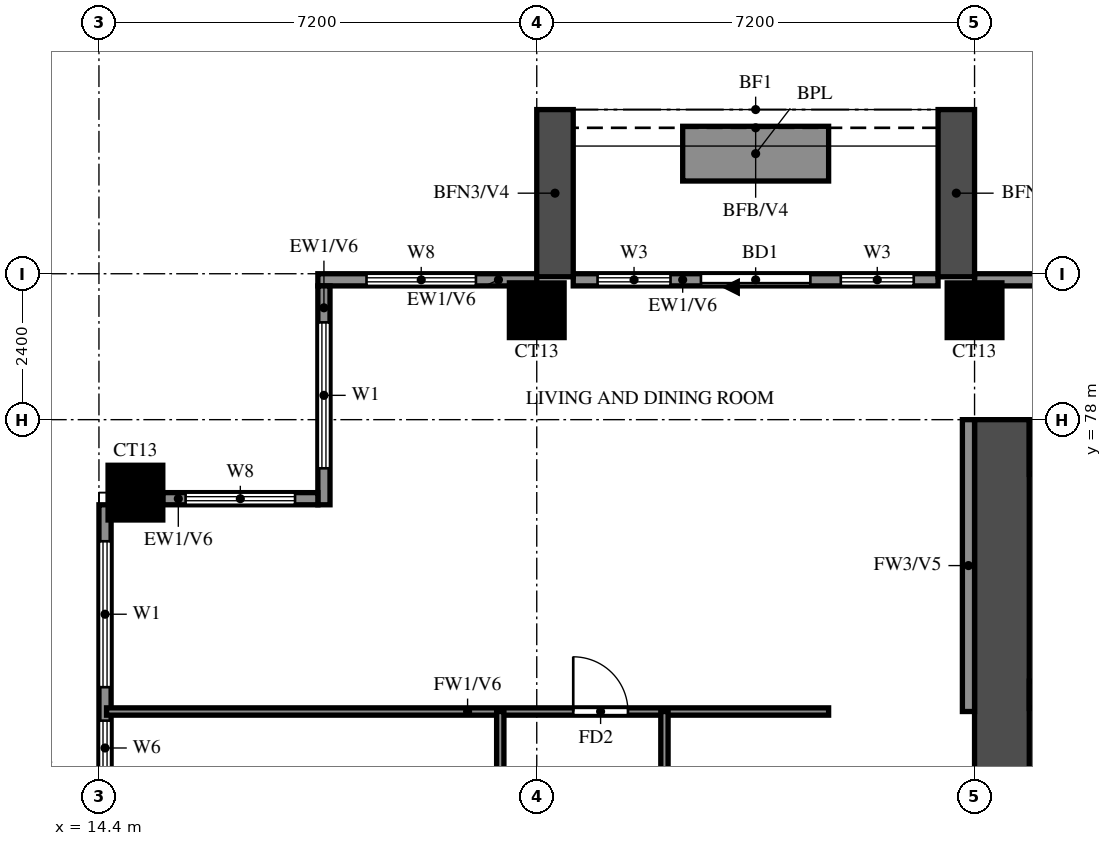
"""IFC4 building model, lengths in metres.
Left out: names, types, materials, properties, quantities, classifications, styles, units other than length and angle.
Written with IfcOpenShell. Run it as: python <this file> out.ifc"""

import sys

from ifc_helpers import new_model, si_unit, direction, frame, frame_2d, origin, origin_2d, place, context, subcontext, project, spatial, rectangle, extrude, source, transform, mapped, element, fill, save


model = new_model("IFC4")
c1 = context("Model", 3, precision=1e-05, world=origin(), true_north=direction((0.0, 1.0)))
c2 = subcontext(c1, "Body", "Model", "MODEL_VIEW")
j1 = project(units=[si_unit("LENGTHUNIT", "METRE"), si_unit("PLANEANGLEUNIT", "RADIAN")], contexts=[c1])
p1 = place(None, origin())
s1 = spatial("IfcSite", under=j1, at=p1, CompositionType="ELEMENT")
p2 = place(p1, origin())
s2 = spatial("IfcBuilding", under=s1, at=p2, CompositionType="ELEMENT")
p3 = place(p2, frame((0.0, 0.0, 104.0)))
s3 = spatial("IfcBuildingStorey", under=s2, at=p3, CompositionType="ELEMENT", Elevation=104.0)
m1 = source(origin(), c2, "Body", "SweptSolid", [
    extrude(rectangle(XDim=0.9, YDim=0.9, at=origin_2d()), origin(), (0.0, 0.0, 1.0), 3.1),
])
for number, where, z_axis, x_axis in (
    (1, (15.0, 76.8, 0.0), (0.0, 0.0, 1.0), (1.0, 0.0, 0.0)),
    (2, (21.6, 79.8, 0.0), (0.0, 0.0, 1.0), (1.0, 0.0, 0.0)),
    (3, (28.8, 79.8, 0.0), (0.0, 0.0, 1.0), (1.0, 0.0, 0.0)),
):
    element("IfcColumn", number, at=place(p3, frame(where, z_axis=z_axis, x_axis=x_axis)), inside=s3, PredefinedType="COLUMN", context=c2, shape_type="MappedRepresentation", body=[
        mapped(m1, transform((0.0, 0.0, 0.0))),
    ])
p4 = place(p3, frame((29.25, 66.0, 0.0), z_axis=(0.0, 0.0, 1.0), x_axis=(0.0, 1.0, 0.0)))
e4 = element("IfcWall", 4, at=p4, inside=s3, PredefinedType="SHEAR", context=c2, shape_type="SweptSolid", body=[
    extrude(rectangle(XDim=12.0, YDim=0.9, at=frame_2d((6.0, 0.0))), origin(), (0.0, 0.0, 1.0), 3.1),
])
p5 = place(p3, frame((29.7, 77.55, 0.0), z_axis=(0.0, 0.0, 1.0), x_axis=(1.0, 0.0, 0.0)))
e5 = element("IfcWall", 5, at=p5, inside=s3, PredefinedType="SHEAR", context=c2, shape_type="SweptSolid", body=[
    extrude(rectangle(XDim=41.4, YDim=0.9, at=frame_2d((20.7, 0.0))), origin(), (0.0, 0.0, 1.0), 3.1),
])
p6 = place(p3, frame((29.7, 73.475, 0.0), z_axis=(0.0, 0.0, 1.0), x_axis=(1.0, 0.0, 0.0)))
e6 = element("IfcWall", 6, at=p6, inside=s3, PredefinedType="SHEAR", context=c2, shape_type="SweptSolid", body=[
    extrude(rectangle(XDim=3.175, YDim=0.45, at=frame_2d((1.587, 0.0))), origin(), (0.0, 0.0, 1.0), 3.1),
])
p7 = place(p3, frame((82.6, 80.3, 0.0), z_axis=(0.0, 0.0, 1.0), x_axis=(-1.0, 0.0, 0.0)))
e7 = element("IfcWall", 7, at=p7, inside=s3, PredefinedType="SOLIDWALL", context=c2, shape_type="SweptSolid", body=[
    extrude(rectangle(XDim=53.8, YDim=0.2, at=frame_2d((26.9, 0.0))), origin(), (0.0, 0.0, 1.0), 3.1),
])
p8 = place(p7, frame((0.7, 0.0, 0.6)))
e8 = element("IfcOpeningElement", 8, at=p8, cuts=e7, PredefinedType="OPENING", context=c2, shape_type="SweptSolid", body=[
    extrude(rectangle(XDim=1.8, YDim=2.4, at=frame_2d((0.9, 1.2))), frame((0.0, 0.11, 0.0), z_axis=(0.0, -1.0, 0.0), x_axis=(1.0, 0.0, 0.0)), (0.0, 0.0, 1.0), 0.22),
])
p9 = place(p7, frame((4.367, 0.0, 0.6)))
e9 = element("IfcOpeningElement", 9, at=p9, cuts=e7, PredefinedType="OPENING", context=c2, shape_type="SweptSolid", body=[
    extrude(rectangle(XDim=2.4, YDim=2.4, at=frame_2d((1.2, 1.2))), frame((0.0, 0.11, 0.0), z_axis=(0.0, -1.0, 0.0), x_axis=(1.0, 0.0, 0.0)), (0.0, 0.0, 1.0), 0.22),
])
p10 = place(p7, frame((7.233, 0.0, 0.6)))
e10 = element("IfcOpeningElement", 10, at=p10, cuts=e7, PredefinedType="OPENING", context=c2, shape_type="SweptSolid", body=[
    extrude(rectangle(XDim=2.4, YDim=2.4, at=frame_2d((1.2, 1.2))), frame((0.0, 0.11, 0.0), z_axis=(0.0, -1.0, 0.0), x_axis=(1.0, 0.0, 0.0)), (0.0, 0.0, 1.0), 0.22),
])
p11 = place(p3, frame((28.2, 80.3, 0.0), z_axis=(0.0, 0.0, 1.0), x_axis=(-1.0, 0.0, 0.0)))
e11 = element("IfcWall", 11, at=p11, inside=s3, PredefinedType="SOLIDWALL", context=c2, shape_type="SweptSolid", body=[
    extrude(rectangle(XDim=6.0, YDim=0.2, at=frame_2d((3.0, 0.0))), origin(), (0.0, 0.0, 1.0), 3.1),
])
p12 = place(p11, frame((2.1, 0.0, 0.0)))
e12 = element("IfcOpeningElement", 12, at=p12, cuts=e11, PredefinedType="OPENING", context=c2, shape_type="SweptSolid", body=[
    extrude(rectangle(XDim=1.8, YDim=2.4, at=frame_2d((0.9, 1.2))), frame((0.0, 0.11, 0.0), z_axis=(0.0, -1.0, 0.0), x_axis=(1.0, 0.0, 0.0)), (0.0, 0.0, 1.0), 0.22),
])
p13 = place(p11, frame((0.4, 0.0, 0.6)))
e13 = element("IfcOpeningElement", 13, at=p13, cuts=e11, PredefinedType="OPENING", context=c2, shape_type="SweptSolid", body=[
    extrude(rectangle(XDim=1.2, YDim=2.4, at=frame_2d((0.6, 1.2))), frame((0.0, 0.11, 0.0), z_axis=(0.0, -1.0, 0.0), x_axis=(1.0, 0.0, 0.0)), (0.0, 0.0, 1.0), 0.22),
])
p14 = place(p11, frame((4.4, 0.0, 0.6)))
e14 = element("IfcOpeningElement", 14, at=p14, cuts=e11, PredefinedType="OPENING", context=c2, shape_type="SweptSolid", body=[
    extrude(rectangle(XDim=1.2, YDim=2.4, at=frame_2d((0.6, 1.2))), frame((0.0, 0.11, 0.0), z_axis=(0.0, -1.0, 0.0), x_axis=(1.0, 0.0, 0.0)), (0.0, 0.0, 1.0), 0.22),
])
p15 = place(p3, frame((21.6, 80.3, 0.0), z_axis=(0.0, 0.0, 1.0), x_axis=(-1.0, 0.0, 0.0)))
e15 = element("IfcWall", 15, at=p15, inside=s3, PredefinedType="SOLIDWALL", context=c2, shape_type="SweptSolid", body=[
    extrude(rectangle(XDim=3.6, YDim=0.2, at=frame_2d((1.8, 0.0))), origin(), (0.0, 0.0, 1.0), 3.1),
])
p16 = place(p15, frame((1.0, 0.0, 0.6)))
e16 = element("IfcOpeningElement", 16, at=p16, cuts=e15, PredefinedType="OPENING", context=c2, shape_type="SweptSolid", body=[
    extrude(rectangle(XDim=1.8, YDim=2.4, at=frame_2d((0.9, 1.2))), frame((0.0, 0.11, 0.0), z_axis=(0.0, -1.0, 0.0), x_axis=(1.0, 0.0, 0.0)), (0.0, 0.0, 1.0), 0.22),
])
p17 = place(p3, frame((18.1, 80.2, 0.0), z_axis=(0.0, 0.0, 1.0), x_axis=(0.0, -1.0, 0.0)))
e17 = element("IfcWall", 17, at=p17, inside=s3, PredefinedType="SOLIDWALL", context=c2, shape_type="SweptSolid", body=[
    extrude(rectangle(XDim=3.6, YDim=0.2, at=frame_2d((1.8, 0.0))), origin(), (0.0, 0.0, 1.0), 3.1),
])
p18 = place(p17, frame((0.6, 0.0, 0.6)))
e18 = element("IfcOpeningElement", 18, at=p18, cuts=e17, PredefinedType="OPENING", context=c2, shape_type="SweptSolid", body=[
    extrude(rectangle(XDim=2.4, YDim=2.4, at=frame_2d((1.2, 1.2))), frame((0.0, 0.11, 0.0), z_axis=(0.0, -1.0, 0.0), x_axis=(1.0, 0.0, 0.0)), (0.0, 0.0, 1.0), 0.22),
])
p19 = place(p3, frame((18.0, 76.7, 0.0), z_axis=(0.0, 0.0, 1.0), x_axis=(-1.0, 0.0, 0.0)))
e19 = element("IfcWall", 19, at=p19, inside=s3, PredefinedType="SOLIDWALL", context=c2, shape_type="SweptSolid", body=[
    extrude(rectangle(XDim=2.55, YDim=0.2, at=frame_2d((1.275, 0.0))), origin(), (0.0, 0.0, 1.0), 3.1),
])
p20 = place(p19, frame((0.375, 0.0, 0.6)))
e20 = element("IfcOpeningElement", 20, at=p20, cuts=e19, PredefinedType="OPENING", context=c2, shape_type="SweptSolid", body=[
    extrude(rectangle(XDim=1.8, YDim=2.4, at=frame_2d((0.9, 1.2))), frame((0.0, 0.11, 0.0), z_axis=(0.0, -1.0, 0.0), x_axis=(1.0, 0.0, 0.0)), (0.0, 0.0, 1.0), 0.22),
])
p21 = place(p3, frame((14.5, 76.6, 0.0), z_axis=(0.0, 0.0, 1.0), x_axis=(0.0, -1.0, 0.0)))
e21 = element("IfcWall", 21, at=p21, inside=s3, PredefinedType="SOLIDWALL", context=c2, shape_type="SweptSolid", body=[
    extrude(rectangle(XDim=39.4, YDim=0.2, at=frame_2d((19.7, 0.0))), origin(), (0.0, 0.0, 1.0), 3.1),
])
p22 = place(p21, frame((7.9, 0.0, 0.0)))
e22 = element("IfcOpeningElement", 22, at=p22, cuts=e21, PredefinedType="OPENING", context=c2, shape_type="SweptSolid", body=[
    extrude(rectangle(XDim=1.8, YDim=2.4, at=frame_2d((0.9, 1.2))), frame((0.0, 0.11, 0.0), z_axis=(0.0, -1.0, 0.0), x_axis=(1.0, 0.0, 0.0)), (0.0, 0.0, 1.0), 0.22),
])
p23 = place(p21, frame((29.567, 0.0, 0.6)))
e23 = element("IfcOpeningElement", 23, at=p23, cuts=e21, PredefinedType="OPENING", context=c2, shape_type="SweptSolid", body=[
    extrude(rectangle(XDim=2.4, YDim=2.4, at=frame_2d((1.2, 1.2))), frame((0.0, 0.11, 0.0), z_axis=(0.0, -1.0, 0.0), x_axis=(1.0, 0.0, 0.0)), (0.0, 0.0, 1.0), 0.22),
])
p24 = place(p21, frame((32.433, 0.0, 0.6)))
e24 = element("IfcOpeningElement", 24, at=p24, cuts=e21, PredefinedType="OPENING", context=c2, shape_type="SweptSolid", body=[
    extrude(rectangle(XDim=2.4, YDim=2.4, at=frame_2d((1.2, 1.2))), frame((0.0, 0.11, 0.0), z_axis=(0.0, -1.0, 0.0), x_axis=(1.0, 0.0, 0.0)), (0.0, 0.0, 1.0), 0.22),
])
p25 = place(p21, frame((36.8, 0.0, 0.6)))
e25 = element("IfcOpeningElement", 25, at=p25, cuts=e21, PredefinedType="OPENING", context=c2, shape_type="SweptSolid", body=[
    extrude(rectangle(XDim=1.8, YDim=2.4, at=frame_2d((0.9, 1.2))), frame((0.0, 0.11, 0.0), z_axis=(0.0, -1.0, 0.0), x_axis=(1.0, 0.0, 0.0)), (0.0, 0.0, 1.0), 0.22),
])
p26 = place(p21, frame((25.4, 0.0, 0.6)))
e26 = element("IfcOpeningElement", 26, at=p26, cuts=e21, PredefinedType="OPENING", context=c2, shape_type="SweptSolid", body=[
    extrude(rectangle(XDim=2.4, YDim=2.4, at=frame_2d((1.2, 1.2))), frame((0.0, 0.11, 0.0), z_axis=(0.0, -1.0, 0.0), x_axis=(1.0, 0.0, 0.0)), (0.0, 0.0, 1.0), 0.22),
])
p27 = place(p21, frame((22.95, 0.0, 1.5)))
e27 = element("IfcOpeningElement", 27, at=p27, cuts=e21, PredefinedType="OPENING", context=c2, shape_type="SweptSolid", body=[
    extrude(rectangle(XDim=0.9, YDim=0.9, at=frame_2d((0.45, 0.45))), frame((0.0, 0.11, 0.0), z_axis=(0.0, -1.0, 0.0), x_axis=(1.0, 0.0, 0.0)), (0.0, 0.0, 1.0), 0.22),
])
p28 = place(p21, frame((15.167, 0.0, 0.6)))
e28 = element("IfcOpeningElement", 28, at=p28, cuts=e21, PredefinedType="OPENING", context=c2, shape_type="SweptSolid", body=[
    extrude(rectangle(XDim=2.4, YDim=2.4, at=frame_2d((1.2, 1.2))), frame((0.0, 0.11, 0.0), z_axis=(0.0, -1.0, 0.0), x_axis=(1.0, 0.0, 0.0)), (0.0, 0.0, 1.0), 0.22),
])
p29 = place(p21, frame((18.033, 0.0, 0.6)))
e29 = element("IfcOpeningElement", 29, at=p29, cuts=e21, PredefinedType="OPENING", context=c2, shape_type="SweptSolid", body=[
    extrude(rectangle(XDim=2.4, YDim=2.4, at=frame_2d((1.2, 1.2))), frame((0.0, 0.11, 0.0), z_axis=(0.0, -1.0, 0.0), x_axis=(1.0, 0.0, 0.0)), (0.0, 0.0, 1.0), 0.22),
])
p30 = place(p21, frame((11.9, 0.0, 0.6)))
e30 = element("IfcOpeningElement", 30, at=p30, cuts=e21, PredefinedType="OPENING", context=c2, shape_type="SweptSolid", body=[
    extrude(rectangle(XDim=1.8, YDim=2.4, at=frame_2d((0.9, 1.2))), frame((0.0, 0.11, 0.0), z_axis=(0.0, -1.0, 0.0), x_axis=(1.0, 0.0, 0.0)), (0.0, 0.0, 1.0), 0.22),
])
p31 = place(p21, frame((3.55, 0.0, 1.5)))
e31 = element("IfcOpeningElement", 31, at=p31, cuts=e21, PredefinedType="OPENING", context=c2, shape_type="SweptSolid", body=[
    extrude(rectangle(XDim=0.9, YDim=0.9, at=frame_2d((0.45, 0.45))), frame((0.0, 0.11, 0.0), z_axis=(0.0, -1.0, 0.0), x_axis=(1.0, 0.0, 0.0)), (0.0, 0.0, 1.0), 0.22),
])
p32 = place(p21, frame((5.45, 0.0, 1.5)))
e32 = element("IfcOpeningElement", 32, at=p32, cuts=e21, PredefinedType="OPENING", context=c2, shape_type="SweptSolid", body=[
    extrude(rectangle(XDim=0.9, YDim=0.9, at=frame_2d((0.45, 0.45))), frame((0.0, 0.11, 0.0), z_axis=(0.0, -1.0, 0.0), x_axis=(1.0, 0.0, 0.0)), (0.0, 0.0, 1.0), 0.22),
])
p33 = place(p21, frame((0.6, 0.0, 0.6)))
e33 = element("IfcOpeningElement", 33, at=p33, cuts=e21, PredefinedType="OPENING", context=c2, shape_type="SweptSolid", body=[
    extrude(rectangle(XDim=2.4, YDim=2.4, at=frame_2d((1.2, 1.2))), frame((0.0, 0.11, 0.0), z_axis=(0.0, -1.0, 0.0), x_axis=(1.0, 0.0, 0.0)), (0.0, 0.0, 1.0), 0.22),
])
for number, where, z_axis, x_axis in (
    (34, (28.5, 80.35, 0.0), (0.0, 0.0, 1.0), (0.0, 1.0, 0.0)),
    (35, (21.9, 80.35, 0.0), (0.0, 0.0, 1.0), (0.0, 1.0, 0.0)),
):
    element("IfcWall", number, at=place(p3, frame(where, z_axis=z_axis, x_axis=x_axis)), inside=s3, PredefinedType="SOLIDWALL", context=c2, shape_type="SweptSolid", body=[
        extrude(rectangle(XDim=2.75, YDim=0.6, at=frame_2d((1.375, 0.0))), origin(), (0.0, 0.0, 1.0), 2.77),
    ])
p34 = place(p3, frame((26.4, 82.375, 0.0), z_axis=(0.0, 0.0, 1.0), x_axis=(-1.0, 0.0, 0.0)))
e36 = element("IfcWall", 36, at=p34, inside=s3, PredefinedType="SOLIDWALL", context=c2, shape_type="SweptSolid", body=[
    extrude(rectangle(XDim=2.4, YDim=0.9, at=frame_2d((1.2, 0.0))), origin(), (0.0, 0.0, 1.0), 0.9),
])
p35 = place(p3, frame((28.7, 73.2, 0.0), z_axis=(0.0, 0.0, 1.0), x_axis=(0.0, 1.0, 0.0)))
e37 = element("IfcWall", 37, at=p35, inside=s3, PredefinedType="SOLIDWALL", context=c2, shape_type="SweptSolid", body=[
    extrude(rectangle(XDim=4.8, YDim=0.2, at=frame_2d((2.4, 0.0))), origin(), (0.0, 0.0, 1.0), 3.1),
])
p36 = place(p3, frame((14.525, 73.2, 0.0), z_axis=(0.0, 0.0, 1.0), x_axis=(1.0, 0.0, 0.0)))
e38 = element("IfcWall", 38, at=p36, inside=s3, PredefinedType="PARTITIONING", context=c2, shape_type="SweptSolid", body=[
    extrude(rectangle(XDim=11.875, YDim=0.12, at=frame_2d((5.938, 0.0))), origin(), (0.0, 0.0, 1.0), 3.1),
])
p37 = place(p36, frame((7.675, 0.0, 0.0)))
e39 = element("IfcOpeningElement", 39, at=p37, cuts=e38, PredefinedType="OPENING", context=c2, shape_type="SweptSolid", body=[
    extrude(rectangle(XDim=0.9, YDim=2.1, at=frame_2d((0.45, 1.05))), frame((0.0, 0.07, 0.0), z_axis=(0.0, -1.0, 0.0), x_axis=(1.0, 0.0, 0.0)), (0.0, 0.0, 1.0), 0.14),
])
p38 = place(p3, frame((21.0, 69.6, 0.0), z_axis=(0.0, 0.0, 1.0), x_axis=(0.0, 1.0, 0.0)))
e40 = element("IfcWall", 40, at=p38, inside=s3, PredefinedType="PARTITIONING", context=c2, shape_type="SweptSolid", body=[
    extrude(rectangle(XDim=3.6, YDim=0.12, at=frame_2d((1.8, 0.0))), origin(), (0.0, 0.0, 1.0), 3.1),
])
p39 = place(p3, frame((23.7, 64.8, 0.0), z_axis=(0.0, 0.0, 1.0), x_axis=(0.0, 1.0, 0.0)))
e41 = element("IfcWall", 41, at=p39, inside=s3, PredefinedType="PARTITIONING", context=c2, shape_type="SweptSolid", body=[
    extrude(rectangle(XDim=8.4, YDim=0.12, at=frame_2d((4.2, 0.0))), origin(), (0.0, 0.0, 1.0), 3.1),
])
p40 = place(p39, frame((1.475, 0.0, 0.0)))
e42 = element("IfcOpeningElement", 42, at=p40, cuts=e41, PredefinedType="OPENING", context=c2, shape_type="SweptSolid", body=[
    extrude(rectangle(XDim=0.9, YDim=2.1, at=frame_2d((0.45, 1.05))), frame((0.0, 0.07, 0.0), z_axis=(0.0, -1.0, 0.0), x_axis=(1.0, 0.0, 0.0)), (0.0, 0.0, 1.0), 0.14),
])
p41 = place(p39, frame((5.675, 0.0, 0.0)))
e43 = element("IfcOpeningElement", 43, at=p41, cuts=e41, PredefinedType="OPENING", context=c2, shape_type="SweptSolid", body=[
    extrude(rectangle(XDim=0.9, YDim=2.1, at=frame_2d((0.45, 1.05))), frame((0.0, 0.07, 0.0), z_axis=(0.0, -1.0, 0.0), x_axis=(1.0, 0.0, 0.0)), (0.0, 0.0, 1.0), 0.14),
])
p42 = place(p12, origin())
e44 = element("IfcDoor", 44, at=p42, inside=s3, OperationType="DOUBLE_DOOR_SLIDING", PredefinedType="DOOR", context=c2, shape_type="SweptSolid", body=[
    extrude(rectangle(XDim=1.8, YDim=2.4, at=frame_2d((0.9, 1.2))), frame((0.0, 0.025, 0.0), z_axis=(0.0, -1.0, 0.0), x_axis=(1.0, 0.0, 0.0)), (0.0, 0.0, 1.0), 0.05),
])
fill(e12, e44)
p43 = place(p13, origin())
e45 = element("IfcWindow", 45, at=p43, inside=s3, PartitioningType="SINGLE_PANEL", PredefinedType="WINDOW", context=c2, shape_type="SweptSolid", body=[
    extrude(rectangle(XDim=1.2, YDim=2.4, at=frame_2d((0.6, 1.2))), frame((0.0, 0.03, 0.0), z_axis=(0.0, -1.0, 0.0), x_axis=(1.0, 0.0, 0.0)), (0.0, 0.0, 1.0), 0.06),
])
fill(e13, e45)
p44 = place(p14, origin())
e46 = element("IfcWindow", 46, at=p44, inside=s3, PartitioningType="SINGLE_PANEL", PredefinedType="WINDOW", context=c2, shape_type="SweptSolid", body=[
    extrude(rectangle(XDim=1.2, YDim=2.4, at=frame_2d((0.6, 1.2))), frame((0.0, 0.03, 0.0), z_axis=(0.0, -1.0, 0.0), x_axis=(1.0, 0.0, 0.0)), (0.0, 0.0, 1.0), 0.06),
])
fill(e14, e46)
p45 = place(p16, origin())
e47 = element("IfcWindow", 47, at=p45, inside=s3, PartitioningType="DOUBLE_PANEL_VERTICAL", PredefinedType="WINDOW", context=c2, shape_type="SweptSolid", body=[
    extrude(rectangle(XDim=1.8, YDim=2.4, at=frame_2d((0.9, 1.2))), frame((0.0, 0.03, 0.0), z_axis=(0.0, -1.0, 0.0), x_axis=(1.0, 0.0, 0.0)), (0.0, 0.0, 1.0), 0.06),
])
fill(e16, e47)
p46 = place(p18, origin())
e48 = element("IfcWindow", 48, at=p46, inside=s3, PartitioningType="DOUBLE_PANEL_VERTICAL", PredefinedType="WINDOW", context=c2, shape_type="SweptSolid", body=[
    extrude(rectangle(XDim=2.4, YDim=2.4, at=frame_2d((1.2, 1.2))), frame((0.0, 0.03, 0.0), z_axis=(0.0, -1.0, 0.0), x_axis=(1.0, 0.0, 0.0)), (0.0, 0.0, 1.0), 0.06),
])
fill(e18, e48)
p47 = place(p20, origin())
e49 = element("IfcWindow", 49, at=p47, inside=s3, PartitioningType="DOUBLE_PANEL_VERTICAL", PredefinedType="WINDOW", context=c2, shape_type="SweptSolid", body=[
    extrude(rectangle(XDim=1.8, YDim=2.4, at=frame_2d((0.9, 1.2))), frame((0.0, 0.03, 0.0), z_axis=(0.0, -1.0, 0.0), x_axis=(1.0, 0.0, 0.0)), (0.0, 0.0, 1.0), 0.06),
])
fill(e20, e49)
p48 = place(p31, origin())
e50 = element("IfcWindow", 50, at=p48, inside=s3, PartitioningType="SINGLE_PANEL", PredefinedType="WINDOW", context=c2, shape_type="SweptSolid", body=[
    extrude(rectangle(XDim=0.9, YDim=0.9, at=frame_2d((0.45, 0.45))), frame((0.0, 0.03, 0.0), z_axis=(0.0, -1.0, 0.0), x_axis=(1.0, 0.0, 0.0)), (0.0, 0.0, 1.0), 0.06),
])
fill(e31, e50)
p49 = place(p33, origin())
e51 = element("IfcWindow", 51, at=p49, inside=s3, PartitioningType="DOUBLE_PANEL_VERTICAL", PredefinedType="WINDOW", context=c2, shape_type="SweptSolid", body=[
    extrude(rectangle(XDim=2.4, YDim=2.4, at=frame_2d((1.2, 1.2))), frame((0.0, 0.03, 0.0), z_axis=(0.0, -1.0, 0.0), x_axis=(1.0, 0.0, 0.0)), (0.0, 0.0, 1.0), 0.06),
])
fill(e33, e51)
p50 = place(p37, origin())
e52 = element("IfcDoor", 52, at=p50, inside=s3, OperationType="SINGLE_SWING_LEFT", PredefinedType="DOOR", context=c2, shape_type="SweptSolid", body=[
    extrude(rectangle(XDim=0.9, YDim=2.1, at=frame_2d((0.45, 1.05))), frame((0.0, 0.025, 0.0), z_axis=(0.0, -1.0, 0.0), x_axis=(1.0, 0.0, 0.0)), (0.0, 0.0, 1.0), 0.05),
])
fill(e39, e52)
save(model, sys.argv[1])
